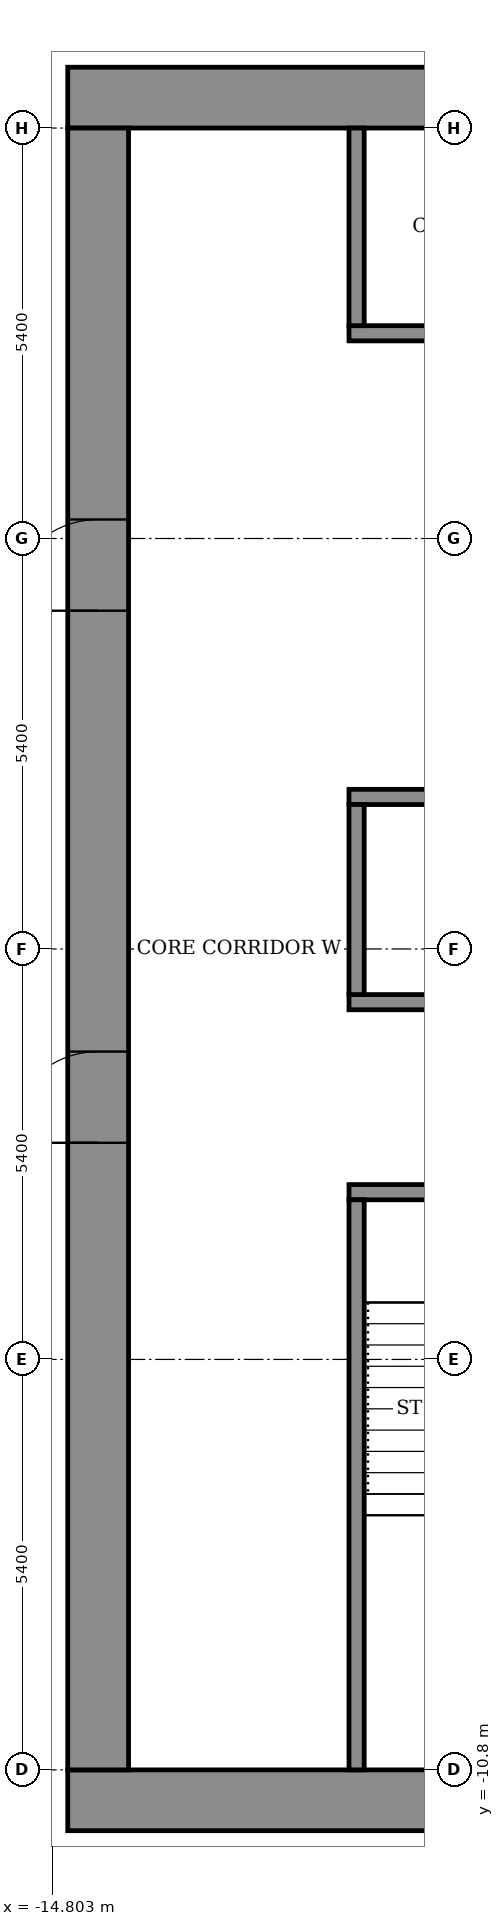
"""IFC4 building model, lengths in metres.
Left out: names, types, materials, properties, quantities, classifications, styles, units other than length and angle.
Written with IfcOpenShell. Run it as: python <this file> out.ifc"""

import sys

from ifc_helpers import new_model, si_unit, direction, frame, frame_2d, origin, place, context, subcontext, project, spatial, rectangle, extrude, element, fill, save


model = new_model("IFC4")
c1 = context("Model", 3, precision=1e-05, world=origin(), true_north=direction((0.0, 1.0)))
c2 = subcontext(c1, "Body", "Model", "MODEL_VIEW")
j1 = project(units=[si_unit("LENGTHUNIT", "METRE"), si_unit("PLANEANGLEUNIT", "RADIAN")], contexts=[c1])
p1 = place(None, origin())
s1 = spatial("IfcSite", under=j1, at=p1, CompositionType="ELEMENT")
p2 = place(p1, origin())
s2 = spatial("IfcBuilding", under=s1, at=p2, CompositionType="ELEMENT")
p3 = place(p2, frame((0.0, 0.0, 238.3)))
s3 = spatial("IfcBuildingStorey", under=s2, at=p3, CompositionType="ELEMENT", Elevation=238.3)
for number, where, z_axis, x_axis in (
    (1, (-14.6, -11.2, 0.0), (0.0, 0.0, 1.0), (1.0, 0.0, 0.0)),
    (2, (-14.6, 11.2, 0.0), (0.0, 0.0, 1.0), (1.0, 0.0, 0.0)),
):
    element("IfcWall", number, at=place(p3, frame(where, z_axis=z_axis, x_axis=x_axis)), inside=s3, PredefinedType="SHEAR", context=c2, shape_type="SweptSolid", body=[
        extrude(rectangle(XDim=29.2, YDim=0.8, at=frame_2d((14.6, 0.0))), origin(), (0.0, 0.0, 1.0), 3.6),
    ])
p4 = place(p3, frame((-14.2, -10.8, 0.0), z_axis=(0.0, 0.0, 1.0), x_axis=(0.0, 1.0, 0.0)))
e3 = element("IfcWall", 3, at=p4, inside=s3, PredefinedType="SHEAR", context=c2, shape_type="SweptSolid", body=[
    extrude(rectangle(XDim=21.6, YDim=0.8, at=frame_2d((10.8, 0.0))), origin(), (0.0, 0.0, 1.0), 3.6),
])
p5 = place(p4, frame((8.25, 0.0, 0.0)))
e4 = element("IfcOpeningElement", 4, at=p5, cuts=e3, PredefinedType="OPENING", context=c2, shape_type="SweptSolid", body=[
    extrude(rectangle(XDim=1.2, YDim=2.1, at=frame_2d((0.6, 1.05))), frame((0.0, 0.41, 0.0), z_axis=(0.0, -1.0, 0.0), x_axis=(1.0, 0.0, 0.0)), (0.0, 0.0, 1.0), 0.82),
])
p6 = place(p4, frame((15.25, 0.0, 0.0)))
e5 = element("IfcOpeningElement", 5, at=p6, cuts=e3, PredefinedType="OPENING", context=c2, shape_type="SweptSolid", body=[
    extrude(rectangle(XDim=1.2, YDim=2.1, at=frame_2d((0.6, 1.05))), frame((0.0, 0.41, 0.0), z_axis=(0.0, -1.0, 0.0), x_axis=(1.0, 0.0, 0.0)), (0.0, 0.0, 1.0), 0.82),
])
p7 = place(p3, frame((-10.9, -3.2, 0.0), z_axis=(0.0, 0.0, 1.0), x_axis=(1.0, 0.0, 0.0)))
e6 = element("IfcWall", 6, at=p7, inside=s3, PredefinedType="SHEAR", context=c2, shape_type="SweptSolid", body=[
    extrude(rectangle(XDim=21.8, YDim=0.2, at=frame_2d((10.9, 0.0))), origin(), (0.0, 0.0, 1.0), 3.05),
])
p8 = place(p7, frame((1.075, 0.0, 0.0)))
e7 = element("IfcOpeningElement", 7, at=p8, cuts=e6, PredefinedType="OPENING", context=c2, shape_type="SweptSolid", body=[
    extrude(rectangle(XDim=1.1, YDim=2.1, at=frame_2d((0.55, 1.05))), frame((0.0, 0.11, 0.0), z_axis=(0.0, -1.0, 0.0), x_axis=(1.0, 0.0, 0.0)), (0.0, 0.0, 1.0), 0.22),
])
p9 = place(p7, frame((10.325, 0.0, 0.0)))
e8 = element("IfcOpeningElement", 8, at=p9, cuts=e6, PredefinedType="OPENING", context=c2, shape_type="SweptSolid", body=[
    extrude(rectangle(XDim=1.1, YDim=2.1, at=frame_2d((0.55, 1.05))), frame((0.0, 0.11, 0.0), z_axis=(0.0, -1.0, 0.0), x_axis=(1.0, 0.0, 0.0)), (0.0, 0.0, 1.0), 0.22),
])
p10 = place(p7, frame((19.625, 0.0, 0.0)))
e9 = element("IfcOpeningElement", 9, at=p10, cuts=e6, PredefinedType="OPENING", context=c2, shape_type="SweptSolid", body=[
    extrude(rectangle(XDim=1.1, YDim=2.1, at=frame_2d((0.55, 1.05))), frame((0.0, 0.11, 0.0), z_axis=(0.0, -1.0, 0.0), x_axis=(1.0, 0.0, 0.0)), (0.0, 0.0, 1.0), 0.22),
])
p11 = place(p7, frame((5.7, 0.0, 0.0)))
e10 = element("IfcOpeningElement", 10, at=p11, cuts=e6, PredefinedType="OPENING", context=c2, shape_type="SweptSolid", body=[
    extrude(rectangle(XDim=1.1, YDim=2.1, at=frame_2d((0.55, 1.05))), frame((0.0, 0.11, 0.0), z_axis=(0.0, -1.0, 0.0), x_axis=(1.0, 0.0, 0.0)), (0.0, 0.0, 1.0), 0.22),
])
p12 = place(p7, frame((14.975, 0.0, 0.0)))
e11 = element("IfcOpeningElement", 11, at=p12, cuts=e6, PredefinedType="OPENING", context=c2, shape_type="SweptSolid", body=[
    extrude(rectangle(XDim=1.1, YDim=2.1, at=frame_2d((0.55, 1.05))), frame((0.0, 0.11, 0.0), z_axis=(0.0, -1.0, 0.0), x_axis=(1.0, 0.0, 0.0)), (0.0, 0.0, 1.0), 0.22),
])
p13 = place(p3, frame((-10.9, -0.7, 0.0), z_axis=(0.0, 0.0, 1.0), x_axis=(1.0, 0.0, 0.0)))
e12 = element("IfcWall", 12, at=p13, inside=s3, PredefinedType="SHEAR", context=c2, shape_type="SweptSolid", body=[
    extrude(rectangle(XDim=21.8, YDim=0.2, at=frame_2d((10.9, 0.0))), origin(), (0.0, 0.0, 1.0), 3.05),
])
p14 = place(p3, frame((-10.9, 2.0, 0.0), z_axis=(0.0, 0.0, 1.0), x_axis=(1.0, 0.0, 0.0)))
e13 = element("IfcWall", 13, at=p14, inside=s3, PredefinedType="SHEAR", context=c2, shape_type="SweptSolid", body=[
    extrude(rectangle(XDim=21.8, YDim=0.2, at=frame_2d((10.9, 0.0))), origin(), (0.0, 0.0, 1.0), 3.05),
])
p15 = place(p14, frame((4.95, 0.0, 0.0)))
e14 = element("IfcOpeningElement", 14, at=p15, cuts=e13, PredefinedType="OPENING", context=c2, shape_type="SweptSolid", body=[
    extrude(rectangle(XDim=1.1, YDim=2.1, at=frame_2d((0.55, 1.05))), frame((0.0, 0.11, 0.0), z_axis=(0.0, -1.0, 0.0), x_axis=(1.0, 0.0, 0.0)), (0.0, 0.0, 1.0), 0.22),
])
p16 = place(p14, frame((7.65, 0.0, 0.0)))
e15 = element("IfcOpeningElement", 15, at=p16, cuts=e13, PredefinedType="OPENING", context=c2, shape_type="SweptSolid", body=[
    extrude(rectangle(XDim=1.1, YDim=2.1, at=frame_2d((0.55, 1.05))), frame((0.0, 0.11, 0.0), z_axis=(0.0, -1.0, 0.0), x_axis=(1.0, 0.0, 0.0)), (0.0, 0.0, 1.0), 0.22),
])
p17 = place(p14, frame((10.35, 0.0, 0.0)))
e16 = element("IfcOpeningElement", 16, at=p17, cuts=e13, PredefinedType="OPENING", context=c2, shape_type="SweptSolid", body=[
    extrude(rectangle(XDim=1.1, YDim=2.1, at=frame_2d((0.55, 1.05))), frame((0.0, 0.11, 0.0), z_axis=(0.0, -1.0, 0.0), x_axis=(1.0, 0.0, 0.0)), (0.0, 0.0, 1.0), 0.22),
])
p18 = place(p14, frame((1.675, 0.0, 0.0)))
e17 = element("IfcOpeningElement", 17, at=p18, cuts=e13, PredefinedType="OPENING", context=c2, shape_type="SweptSolid", body=[
    extrude(rectangle(XDim=0.9, YDim=2.1, at=frame_2d((0.45, 1.05))), frame((0.0, 0.11, 0.0), z_axis=(0.0, -1.0, 0.0), x_axis=(1.0, 0.0, 0.0)), (0.0, 0.0, 1.0), 0.22),
])
p19 = place(p14, frame((13.825, 0.0, 0.0)))
e18 = element("IfcOpeningElement", 18, at=p19, cuts=e13, PredefinedType="OPENING", context=c2, shape_type="SweptSolid", body=[
    extrude(rectangle(XDim=0.9, YDim=2.1, at=frame_2d((0.45, 1.05))), frame((0.0, 0.11, 0.0), z_axis=(0.0, -1.0, 0.0), x_axis=(1.0, 0.0, 0.0)), (0.0, 0.0, 1.0), 0.22),
])
p20 = place(p14, frame((18.55, 0.0, 0.0)))
e19 = element("IfcOpeningElement", 19, at=p20, cuts=e13, PredefinedType="OPENING", context=c2, shape_type="SweptSolid", body=[
    extrude(rectangle(XDim=0.9, YDim=2.1, at=frame_2d((0.45, 1.05))), frame((0.0, 0.11, 0.0), z_axis=(0.0, -1.0, 0.0), x_axis=(1.0, 0.0, 0.0)), (0.0, 0.0, 1.0), 0.22),
])
p21 = place(p3, frame((-10.9, 8.1, 0.0), z_axis=(0.0, 0.0, 1.0), x_axis=(1.0, 0.0, 0.0)))
e20 = element("IfcWall", 20, at=p21, inside=s3, PredefinedType="SHEAR", context=c2, shape_type="SweptSolid", body=[
    extrude(rectangle(XDim=21.8, YDim=0.2, at=frame_2d((10.9, 0.0))), origin(), (0.0, 0.0, 1.0), 3.05),
])
p22 = place(p21, frame((4.95, 0.0, 0.0)))
e21 = element("IfcOpeningElement", 21, at=p22, cuts=e20, PredefinedType="OPENING", context=c2, shape_type="SweptSolid", body=[
    extrude(rectangle(XDim=1.1, YDim=2.1, at=frame_2d((0.55, 1.05))), frame((0.0, 0.11, 0.0), z_axis=(0.0, -1.0, 0.0), x_axis=(1.0, 0.0, 0.0)), (0.0, 0.0, 1.0), 0.22),
])
p23 = place(p21, frame((7.65, 0.0, 0.0)))
e22 = element("IfcOpeningElement", 22, at=p23, cuts=e20, PredefinedType="OPENING", context=c2, shape_type="SweptSolid", body=[
    extrude(rectangle(XDim=1.1, YDim=2.1, at=frame_2d((0.55, 1.05))), frame((0.0, 0.11, 0.0), z_axis=(0.0, -1.0, 0.0), x_axis=(1.0, 0.0, 0.0)), (0.0, 0.0, 1.0), 0.22),
])
p24 = place(p21, frame((10.35, 0.0, 0.0)))
e23 = element("IfcOpeningElement", 23, at=p24, cuts=e20, PredefinedType="OPENING", context=c2, shape_type="SweptSolid", body=[
    extrude(rectangle(XDim=1.1, YDim=2.1, at=frame_2d((0.55, 1.05))), frame((0.0, 0.11, 0.0), z_axis=(0.0, -1.0, 0.0), x_axis=(1.0, 0.0, 0.0)), (0.0, 0.0, 1.0), 0.22),
])
p25 = place(p21, frame((1.675, 0.0, 0.0)))
e24 = element("IfcOpeningElement", 24, at=p25, cuts=e20, PredefinedType="OPENING", context=c2, shape_type="SweptSolid", body=[
    extrude(rectangle(XDim=0.9, YDim=2.1, at=frame_2d((0.45, 1.05))), frame((0.0, 0.11, 0.0), z_axis=(0.0, -1.0, 0.0), x_axis=(1.0, 0.0, 0.0)), (0.0, 0.0, 1.0), 0.22),
])
p26 = place(p21, frame((13.825, 0.0, 0.0)))
e25 = element("IfcOpeningElement", 25, at=p26, cuts=e20, PredefinedType="OPENING", context=c2, shape_type="SweptSolid", body=[
    extrude(rectangle(XDim=0.9, YDim=2.1, at=frame_2d((0.45, 1.05))), frame((0.0, 0.11, 0.0), z_axis=(0.0, -1.0, 0.0), x_axis=(1.0, 0.0, 0.0)), (0.0, 0.0, 1.0), 0.22),
])
p27 = place(p21, frame((18.55, 0.0, 0.0)))
e26 = element("IfcOpeningElement", 26, at=p27, cuts=e20, PredefinedType="OPENING", context=c2, shape_type="SweptSolid", body=[
    extrude(rectangle(XDim=0.9, YDim=2.1, at=frame_2d((0.45, 1.05))), frame((0.0, 0.11, 0.0), z_axis=(0.0, -1.0, 0.0), x_axis=(1.0, 0.0, 0.0)), (0.0, 0.0, 1.0), 0.22),
])
p28 = place(p3, frame((-10.8, -10.8, 0.0), z_axis=(0.0, 0.0, 1.0), x_axis=(0.0, 1.0, 0.0)))
e27 = element("IfcWall", 27, at=p28, inside=s3, PredefinedType="SHEAR", context=c2, shape_type="SweptSolid", body=[
    extrude(rectangle(XDim=7.5, YDim=0.2, at=frame_2d((3.75, 0.0))), origin(), (0.0, 0.0, 1.0), 3.05),
])
p29 = place(p3, frame((-10.8, -0.6, 0.0), z_axis=(0.0, 0.0, 1.0), x_axis=(0.0, 1.0, 0.0)))
e28 = element("IfcWall", 28, at=p29, inside=s3, PredefinedType="STANDARD", context=c2, shape_type="SweptSolid", body=[
    extrude(rectangle(XDim=2.5, YDim=0.2, at=frame_2d((1.25, 0.0))), origin(), (0.0, 0.0, 1.0), 3.05),
])
p30 = place(p3, frame((-10.8, 8.2, 0.0), z_axis=(0.0, 0.0, 1.0), x_axis=(0.0, 1.0, 0.0)))
e29 = element("IfcWall", 29, at=p30, inside=s3, PredefinedType="STANDARD", context=c2, shape_type="SweptSolid", body=[
    extrude(rectangle(XDim=2.6, YDim=0.2, at=frame_2d((1.3, 0.0))), origin(), (0.0, 0.0, 1.0), 3.05),
])
p31 = place(p5, origin())
e30 = element("IfcDoor", 30, at=p31, inside=s3, OperationType="DOUBLE_DOOR_SINGLE_SWING", PredefinedType="DOOR", context=c2, shape_type="SweptSolid", body=[
    extrude(rectangle(XDim=1.2, YDim=2.1, at=frame_2d((0.6, 1.05))), frame((0.0, 0.025, 0.0), z_axis=(0.0, -1.0, 0.0), x_axis=(1.0, 0.0, 0.0)), (0.0, 0.0, 1.0), 0.05),
])
fill(e4, e30)
p32 = place(p6, origin())
e31 = element("IfcDoor", 31, at=p32, inside=s3, OperationType="DOUBLE_DOOR_SINGLE_SWING", PredefinedType="DOOR", context=c2, shape_type="SweptSolid", body=[
    extrude(rectangle(XDim=1.2, YDim=2.1, at=frame_2d((0.6, 1.05))), frame((0.0, 0.025, 0.0), z_axis=(0.0, -1.0, 0.0), x_axis=(1.0, 0.0, 0.0)), (0.0, 0.0, 1.0), 0.05),
])
fill(e5, e31)
save(model, sys.argv[1])
